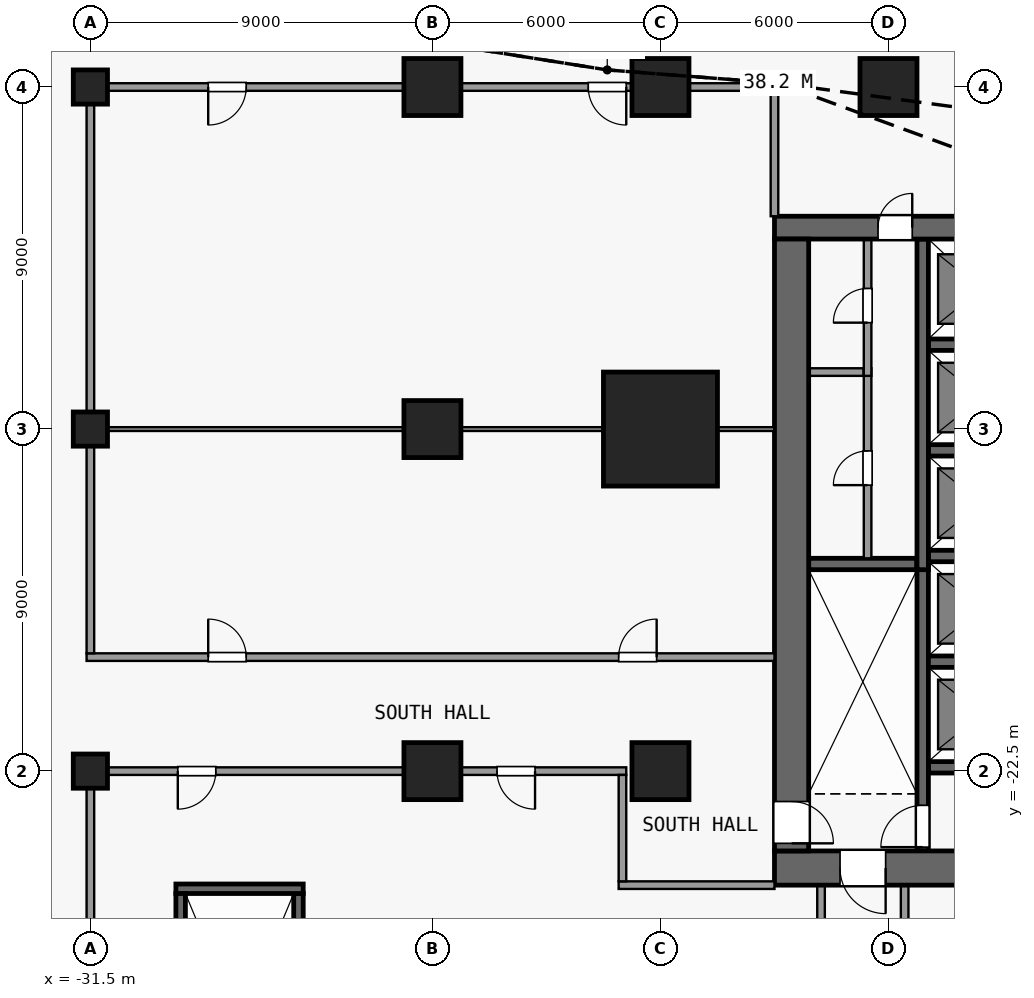
"""IFC4 building model, lengths in metres.
Left out: names, types, materials, properties, quantities, classifications, styles, units other than length and angle.
Written with IfcOpenShell. Run it as: python <this file> out.ifc"""

import sys

from ifc_helpers import new_model, si_unit, direction, frame, frame_2d, origin, origin_2d, place, context, subcontext, project, spatial, rectangle, extrude, element, fill, save


model = new_model("IFC4")
c1 = context("Model", 3, precision=1e-05, world=origin(), true_north=direction((0.0, 1.0)))
c2 = subcontext(c1, "Body", "Model", "MODEL_VIEW")
j1 = project(units=[si_unit("LENGTHUNIT", "METRE"), si_unit("PLANEANGLEUNIT", "RADIAN")], contexts=[c1])
p1 = place(None, origin())
s1 = spatial("IfcSite", under=j1, at=p1, CompositionType="ELEMENT")
p2 = place(p1, origin())
s2 = spatial("IfcBuilding", under=s1, at=p2, CompositionType="ELEMENT")
p3 = place(p2, origin())
s3 = spatial("IfcBuildingStorey", under=s2, at=p3, CompositionType="ELEMENT", Elevation=0.0)
for number, where, z_axis, x_axis in (
    (1, (-31.5, -22.5, 0.0), (0.0, 0.0, 1.0), (1.0, 0.0, 0.0)),
    (2, (-31.5, -13.5, 0.0), (0.0, 0.0, 1.0), (1.0, 0.0, 0.0)),
    (3, (-31.5, -4.5, 0.0), (0.0, 0.0, 1.0), (1.0, 0.0, 0.0)),
):
    element("IfcColumn", number, at=place(p3, frame(where, z_axis=z_axis, x_axis=x_axis)), inside=s3, PredefinedType="COLUMN", context=c2, shape_type="SweptSolid", body=[
        extrude(rectangle(XDim=0.9, YDim=0.9, at=origin_2d()), origin(), (0.0, 0.0, 1.0), 8.0),
    ])
for number, where, z_axis, x_axis in (
    (4, (-22.5, -22.5, 0.0), (0.0, 0.0, 1.0), (1.0, 0.0, 0.0)),
    (5, (-22.5, -13.5, 0.0), (0.0, 0.0, 1.0), (1.0, 0.0, 0.0)),
    (6, (-22.5, -4.5, 0.0), (0.0, 0.0, 1.0), (1.0, 0.0, 0.0)),
    (7, (-16.5, -22.5, 0.0), (0.0, 0.0, 1.0), (1.0, 0.0, 0.0)),
):
    element("IfcColumn", number, at=place(p3, frame(where, z_axis=z_axis, x_axis=x_axis)), inside=s3, PredefinedType="COLUMN", context=c2, shape_type="SweptSolid", body=[
        extrude(rectangle(XDim=1.5, YDim=1.5, at=origin_2d()), origin(), (0.0, 0.0, 1.0), 8.0),
    ])
p4 = place(p3, frame((-16.5, -13.5, 0.0), z_axis=(0.0, 0.0, 1.0), x_axis=(1.0, 0.0, 0.0)))
e8 = element("IfcColumn", 8, at=p4, inside=s3, PredefinedType="COLUMN", context=c2, shape_type="SweptSolid", body=[
    extrude(rectangle(XDim=3.0, YDim=3.0, at=origin_2d()), origin(), (0.0, 0.0, 1.0), 8.0),
])
for number, where, z_axis, x_axis in (
    (9, (-16.5, -4.5, 0.0), (0.0, 0.0, 1.0), (1.0, 0.0, 0.0)),
    (10, (-10.5, -4.5, 0.0), (0.0, 0.0, 1.0), (1.0, 0.0, 0.0)),
):
    element("IfcColumn", number, at=place(p3, frame(where, z_axis=z_axis, x_axis=x_axis)), inside=s3, PredefinedType="COLUMN", context=c2, shape_type="SweptSolid", body=[
        extrude(rectangle(XDim=1.5, YDim=1.5, at=origin_2d()), origin(), (0.0, 0.0, 1.0), 8.0),
    ])
p5 = place(p3, frame((13.5, -25.05, 0.0), z_axis=(0.0, 0.0, 1.0), x_axis=(-1.0, 0.0, 0.0)))
e11 = element("IfcWall", 11, at=p5, inside=s3, PredefinedType="SHEAR", context=c2, shape_type="SweptSolid", body=[
    extrude(rectangle(XDim=27.0, YDim=0.9, at=frame_2d((13.5, 0.0))), origin(), (0.0, 0.0, 1.0), 7.65),
])
p6 = place(p5, frame((24.075, 0.0, 0.0)))
e12 = element("IfcOpeningElement", 12, at=p6, cuts=e11, PredefinedType="OPENING", context=c2, shape_type="SweptSolid", body=[
    extrude(rectangle(XDim=1.2, YDim=2.1, at=frame_2d((0.6, 1.05))), frame((0.0, 0.46, 0.0), z_axis=(0.0, -1.0, 0.0), x_axis=(1.0, 0.0, 0.0)), (0.0, 0.0, 1.0), 0.92),
])
p7 = place(p5, frame((1.725, 0.0, 0.0)))
e13 = element("IfcOpeningElement", 13, at=p7, cuts=e11, PredefinedType="OPENING", context=c2, shape_type="SweptSolid", body=[
    extrude(rectangle(XDim=1.2, YDim=2.1, at=frame_2d((0.6, 1.05))), frame((0.0, 0.46, 0.0), z_axis=(0.0, -1.0, 0.0), x_axis=(1.0, 0.0, 0.0)), (0.0, 0.0, 1.0), 0.92),
])
p8 = place(p3, frame((-13.5, -8.2, 0.0), z_axis=(0.0, 0.0, 1.0), x_axis=(1.0, 0.0, 0.0)))
e14 = element("IfcWall", 14, at=p8, inside=s3, PredefinedType="SHEAR", context=c2, shape_type="SweptSolid", body=[
    extrude(rectangle(XDim=27.0, YDim=0.6, at=frame_2d((13.5, 0.0))), origin(), (0.0, 0.0, 1.0), 7.65),
])
p9 = place(p8, frame((7.8, 0.0, 0.0)))
e15 = element("IfcOpeningElement", 15, at=p9, cuts=e14, PredefinedType="OPENING", context=c2, shape_type="SweptSolid", body=[
    extrude(rectangle(XDim=1.8, YDim=2.1, at=frame_2d((0.9, 1.05))), frame((0.0, 0.31, 0.0), z_axis=(0.0, -1.0, 0.0), x_axis=(1.0, 0.0, 0.0)), (0.0, 0.0, 1.0), 0.62),
])
p10 = place(p8, frame((17.4, 0.0, 0.0)))
e16 = element("IfcOpeningElement", 16, at=p10, cuts=e14, PredefinedType="OPENING", context=c2, shape_type="SweptSolid", body=[
    extrude(rectangle(XDim=1.8, YDim=2.1, at=frame_2d((0.9, 1.05))), frame((0.0, 0.31, 0.0), z_axis=(0.0, -1.0, 0.0), x_axis=(1.0, 0.0, 0.0)), (0.0, 0.0, 1.0), 0.62),
])
p11 = place(p8, frame((2.725, 0.0, 0.0)))
e17 = element("IfcOpeningElement", 17, at=p11, cuts=e14, PredefinedType="OPENING", context=c2, shape_type="SweptSolid", body=[
    extrude(rectangle(XDim=0.9, YDim=2.1, at=frame_2d((0.45, 1.05))), frame((0.0, 0.31, 0.0), z_axis=(0.0, -1.0, 0.0), x_axis=(1.0, 0.0, 0.0)), (0.0, 0.0, 1.0), 0.62),
])
p12 = place(p8, frame((24.075, 0.0, 0.0)))
e18 = element("IfcOpeningElement", 18, at=p12, cuts=e14, PredefinedType="OPENING", context=c2, shape_type="SweptSolid", body=[
    extrude(rectangle(XDim=1.2, YDim=2.1, at=frame_2d((0.6, 1.05))), frame((0.0, 0.31, 0.0), z_axis=(0.0, -1.0, 0.0), x_axis=(1.0, 0.0, 0.0)), (0.0, 0.0, 1.0), 0.62),
])
p13 = place(p3, frame((-13.05, -8.5, 0.0), z_axis=(0.0, 0.0, 1.0), x_axis=(0.0, -1.0, 0.0)))
e19 = element("IfcWall", 19, at=p13, inside=s3, PredefinedType="SHEAR", context=c2, shape_type="SweptSolid", body=[
    extrude(rectangle(XDim=16.1, YDim=0.9, at=frame_2d((8.05, 0.0))), origin(), (0.0, 0.0, 1.0), 7.65),
])
p14 = place(p13, frame((14.8, 0.0, 0.0)))
e20 = element("IfcOpeningElement", 20, at=p14, cuts=e19, PredefinedType="OPENING", context=c2, shape_type="SweptSolid", body=[
    extrude(rectangle(XDim=1.1, YDim=2.1, at=frame_2d((0.55, 1.05))), frame((0.0, 0.46, 0.0), z_axis=(0.0, -1.0, 0.0), x_axis=(1.0, 0.0, 0.0)), (0.0, 0.0, 1.0), 0.92),
])
for number, where, z_axis, x_axis in (
    (21, (-9.45, -22.4, 0.0), (0.0, 0.0, 1.0), (1.0, 0.0, 0.0)),
    (22, (-9.45, -19.62, 0.0), (0.0, 0.0, 1.0), (1.0, 0.0, 0.0)),
):
    element("IfcWall", number, at=place(p3, frame(where, z_axis=z_axis, x_axis=x_axis)), inside=s3, PredefinedType="SHEAR", context=c2, shape_type="SweptSolid", body=[
        extrude(rectangle(XDim=2.8, YDim=0.3, at=frame_2d((1.4, 0.0))), origin(), (0.0, 0.0, 1.0), 7.65),
    ])
p15 = place(p3, frame((-12.6, -17.05, 0.0), z_axis=(0.0, 0.0, 1.0), x_axis=(1.0, 0.0, 0.0)))
e23 = element("IfcWall", 23, at=p15, inside=s3, PredefinedType="SHEAR", context=c2, shape_type="SweptSolid", body=[
    extrude(rectangle(XDim=2.85, YDim=0.3, at=frame_2d((1.425, 0.0))), origin(), (0.0, 0.0, 1.0), 7.65),
])
for number, where, z_axis, x_axis in (
    (24, (-9.45, -16.84, 0.0), (0.0, 0.0, 1.0), (1.0, 0.0, 0.0)),
    (25, (-9.45, -14.06, 0.0), (0.0, 0.0, 1.0), (1.0, 0.0, 0.0)),
):
    element("IfcWall", number, at=place(p3, frame(where, z_axis=z_axis, x_axis=x_axis)), inside=s3, PredefinedType="SHEAR", context=c2, shape_type="SweptSolid", body=[
        extrude(rectangle(XDim=2.8, YDim=0.3, at=frame_2d((1.4, 0.0))), origin(), (0.0, 0.0, 1.0), 7.65),
    ])
p16 = place(p3, frame((-12.6, -12.0, 0.0), z_axis=(0.0, 0.0, 1.0), x_axis=(1.0, 0.0, 0.0)))
e26 = element("IfcWall", 26, at=p16, inside=s3, PredefinedType="PARTITIONING", context=c2, shape_type="SweptSolid", body=[
    extrude(rectangle(XDim=1.45, YDim=0.2, at=frame_2d((0.725, 0.0))), origin(), (0.0, 0.0, 1.0), 7.65),
])
p17 = place(p3, frame((-9.45, -11.28, 0.0), z_axis=(0.0, 0.0, 1.0), x_axis=(1.0, 0.0, 0.0)))
e27 = element("IfcWall", 27, at=p17, inside=s3, PredefinedType="SHEAR", context=c2, shape_type="SweptSolid", body=[
    extrude(rectangle(XDim=2.8, YDim=0.3, at=frame_2d((1.4, 0.0))), origin(), (0.0, 0.0, 1.0), 7.65),
])
p18 = place(p3, frame((-11.05, -16.9, 0.0), z_axis=(0.0, 0.0, 1.0), x_axis=(0.0, 1.0, 0.0)))
e28 = element("IfcWall", 28, at=p18, inside=s3, PredefinedType="PARTITIONING", context=c2, shape_type="SweptSolid", body=[
    extrude(rectangle(XDim=5.0, YDim=0.2, at=frame_2d((2.5, 0.0))), origin(), (0.0, 0.0, 1.0), 7.65),
])
p19 = place(p18, frame((1.925, 0.0, 0.0)))
e29 = element("IfcOpeningElement", 29, at=p19, cuts=e28, PredefinedType="OPENING", context=c2, shape_type="SweptSolid", body=[
    extrude(rectangle(XDim=0.9, YDim=2.1, at=frame_2d((0.45, 1.05))), frame((0.0, 0.11, 0.0), z_axis=(0.0, -1.0, 0.0), x_axis=(1.0, 0.0, 0.0)), (0.0, 0.0, 1.0), 0.22),
])
p20 = place(p3, frame((-11.05, -12.1, 0.0), z_axis=(0.0, 0.0, 1.0), x_axis=(0.0, 1.0, 0.0)))
e30 = element("IfcWall", 30, at=p20, inside=s3, PredefinedType="PARTITIONING", context=c2, shape_type="SweptSolid", body=[
    extrude(rectangle(XDim=3.6, YDim=0.2, at=frame_2d((1.8, 0.0))), origin(), (0.0, 0.0, 1.0), 7.65),
])
p21 = place(p20, frame((1.4, 0.0, 0.0)))
e31 = element("IfcOpeningElement", 31, at=p21, cuts=e30, PredefinedType="OPENING", context=c2, shape_type="SweptSolid", body=[
    extrude(rectangle(XDim=0.9, YDim=2.1, at=frame_2d((0.45, 1.05))), frame((0.0, 0.11, 0.0), z_axis=(0.0, -1.0, 0.0), x_axis=(1.0, 0.0, 0.0)), (0.0, 0.0, 1.0), 0.22),
])
p22 = place(p3, frame((-9.6, -24.6, 0.0), z_axis=(0.0, 0.0, 1.0), x_axis=(0.0, 1.0, 0.0)))
e32 = element("IfcWall", 32, at=p22, inside=s3, PredefinedType="SHEAR", context=c2, shape_type="SweptSolid", body=[
    extrude(rectangle(XDim=7.7, YDim=0.3, at=frame_2d((3.85, 0.0))), origin(), (0.0, 0.0, 1.0), 7.65),
])
p23 = place(p22, frame((0.1, 0.0, 0.0)))
e33 = element("IfcOpeningElement", 33, at=p23, cuts=e32, PredefinedType="OPENING", context=c2, shape_type="SweptSolid", body=[
    extrude(rectangle(XDim=1.1, YDim=2.1, at=frame_2d((0.55, 1.05))), frame((0.0, 0.16, 0.0), z_axis=(0.0, -1.0, 0.0), x_axis=(1.0, 0.0, 0.0)), (0.0, 0.0, 1.0), 0.32),
])
p24 = place(p3, frame((-9.6, -17.2, 0.0), z_axis=(0.0, 0.0, 1.0), x_axis=(0.0, 1.0, 0.0)))
e34 = element("IfcWall", 34, at=p24, inside=s3, PredefinedType="SHEAR", context=c2, shape_type="SweptSolid", body=[
    extrude(rectangle(XDim=8.7, YDim=0.3, at=frame_2d((4.35, 0.0))), origin(), (0.0, 0.0, 1.0), 7.65),
])
p25 = place(p3, frame((-12.275, -25.5, 0.0), z_axis=(0.0, 0.0, 1.0), x_axis=(0.0, -1.0, 0.0)))
e35 = element("IfcWall", 35, at=p25, inside=s3, PredefinedType="PARTITIONING", context=c2, shape_type="SweptSolid", body=[
    extrude(rectangle(XDim=8.85, YDim=0.2, at=frame_2d((4.425, 0.0))), origin(), (0.0, 0.0, 1.0), 7.65),
])
p26 = place(p3, frame((-10.075, -34.35, 0.0), z_axis=(0.0, 0.0, 1.0), x_axis=(0.0, 1.0, 0.0)))
e36 = element("IfcWall", 36, at=p26, inside=s3, PredefinedType="PARTITIONING", context=c2, shape_type="SweptSolid", body=[
    extrude(rectangle(XDim=8.85, YDim=0.2, at=frame_2d((4.425, 0.0))), origin(), (0.0, 0.0, 1.0), 7.65),
])
p27 = place(p26, frame((0.85, 0.0, 0.0)))
e37 = element("IfcOpeningElement", 37, at=p27, cuts=e36, PredefinedType="OPENING", context=c2, shape_type="SweptSolid", body=[
    extrude(rectangle(XDim=1.0, YDim=2.1, at=frame_2d((0.5, 1.05))), frame((0.0, 0.11, 0.0), z_axis=(0.0, -1.0, 0.0), x_axis=(1.0, 0.0, 0.0)), (0.0, 0.0, 1.0), 0.22),
])
for number, where, z_axis, x_axis in (
    (38, (-29.125, -27.07, 0.0), (0.0, 0.0, 1.0), (0.0, 1.0, 0.0)),
    (39, (-26.025, -27.07, 0.0), (0.0, 0.0, 1.0), (0.0, 1.0, 0.0)),
):
    element("IfcWall", number, at=place(p3, frame(where, z_axis=z_axis, x_axis=x_axis)), inside=s3, PredefinedType="SHEAR", context=c2, shape_type="SweptSolid", body=[
        extrude(rectangle(XDim=1.35, YDim=0.25, at=frame_2d((0.675, 0.0))), origin(), (0.0, 0.0, 1.0), 7.65),
    ])
p28 = place(p3, frame((-29.25, -25.595, 0.0), z_axis=(0.0, 0.0, 1.0), x_axis=(1.0, 0.0, 0.0)))
e40 = element("IfcWall", 40, at=p28, inside=s3, PredefinedType="SHEAR", context=c2, shape_type="SweptSolid", body=[
    extrude(rectangle(XDim=3.35, YDim=0.25, at=frame_2d((1.675, 0.0))), origin(), (0.0, 0.0, 1.0), 7.65),
])
p29 = place(p3, frame((-17.6, -25.5, 0.0), z_axis=(0.0, 0.0, 1.0), x_axis=(1.0, 0.0, 0.0)))
e41 = element("IfcWall", 41, at=p29, inside=s3, PredefinedType="PARTITIONING", context=c2, shape_type="SweptSolid", body=[
    extrude(rectangle(XDim=4.1, YDim=0.2, at=frame_2d((2.05, 0.0))), origin(), (0.0, 0.0, 1.0), 7.65),
])
p30 = place(p3, frame((-31.6, -22.5, 0.0), z_axis=(0.0, 0.0, 1.0), x_axis=(1.0, 0.0, 0.0)))
e42 = element("IfcWall", 42, at=p30, inside=s3, PredefinedType="PARTITIONING", context=c2, shape_type="SweptSolid", body=[
    extrude(rectangle(XDim=14.2, YDim=0.2, at=frame_2d((7.1, 0.0))), origin(), (0.0, 0.0, 1.0), 7.65),
])
p31 = place(p30, frame((2.4, 0.0, 0.0)))
e43 = element("IfcOpeningElement", 43, at=p31, cuts=e42, PredefinedType="OPENING", context=c2, shape_type="SweptSolid", body=[
    extrude(rectangle(XDim=1.0, YDim=2.1, at=frame_2d((0.5, 1.05))), frame((0.0, 0.11, 0.0), z_axis=(0.0, -1.0, 0.0), x_axis=(1.0, 0.0, 0.0)), (0.0, 0.0, 1.0), 0.22),
])
p32 = place(p30, frame((10.8, 0.0, 0.0)))
e44 = element("IfcOpeningElement", 44, at=p32, cuts=e42, PredefinedType="OPENING", context=c2, shape_type="SweptSolid", body=[
    extrude(rectangle(XDim=1.0, YDim=2.1, at=frame_2d((0.5, 1.05))), frame((0.0, 0.11, 0.0), z_axis=(0.0, -1.0, 0.0), x_axis=(1.0, 0.0, 0.0)), (0.0, 0.0, 1.0), 0.22),
])
p33 = place(p3, frame((-31.6, -19.5, 0.0), z_axis=(0.0, 0.0, 1.0), x_axis=(1.0, 0.0, 0.0)))
e45 = element("IfcWall", 45, at=p33, inside=s3, PredefinedType="PARTITIONING", context=c2, shape_type="SweptSolid", body=[
    extrude(rectangle(XDim=18.1, YDim=0.2, at=frame_2d((9.05, 0.0))), origin(), (0.0, 0.0, 1.0), 7.65),
])
p34 = place(p33, frame((3.2, 0.0, 0.0)))
e46 = element("IfcOpeningElement", 46, at=p34, cuts=e45, PredefinedType="OPENING", context=c2, shape_type="SweptSolid", body=[
    extrude(rectangle(XDim=1.0, YDim=2.1, at=frame_2d((0.5, 1.05))), frame((0.0, 0.11, 0.0), z_axis=(0.0, -1.0, 0.0), x_axis=(1.0, 0.0, 0.0)), (0.0, 0.0, 1.0), 0.22),
])
p35 = place(p33, frame((14.0, 0.0, 0.0)))
e47 = element("IfcOpeningElement", 47, at=p35, cuts=e45, PredefinedType="OPENING", context=c2, shape_type="SweptSolid", body=[
    extrude(rectangle(XDim=1.0, YDim=2.1, at=frame_2d((0.5, 1.05))), frame((0.0, 0.11, 0.0), z_axis=(0.0, -1.0, 0.0), x_axis=(1.0, 0.0, 0.0)), (0.0, 0.0, 1.0), 0.22),
])
p36 = place(p3, frame((-31.4, -13.5, 0.0), z_axis=(0.0, 0.0, 1.0), x_axis=(1.0, 0.0, 0.0)))
e48 = element("IfcWall", 48, at=p36, inside=s3, PredefinedType="PARTITIONING", context=c2, shape_type="SweptSolid", body=[
    extrude(rectangle(XDim=17.9, YDim=0.1, at=frame_2d((8.95, 0.0))), origin(), (0.0, 0.0, 1.0), 7.65),
])
p37 = place(p3, frame((-31.6, -4.5, 0.0), z_axis=(0.0, 0.0, 1.0), x_axis=(1.0, 0.0, 0.0)))
e49 = element("IfcWall", 49, at=p37, inside=s3, PredefinedType="PARTITIONING", context=c2, shape_type="SweptSolid", body=[
    extrude(rectangle(XDim=18.2, YDim=0.2, at=frame_2d((9.1, 0.0))), origin(), (0.0, 0.0, 1.0), 7.65),
])
p38 = place(p37, frame((3.2, 0.0, 0.0)))
e50 = element("IfcOpeningElement", 50, at=p38, cuts=e49, PredefinedType="OPENING", context=c2, shape_type="SweptSolid", body=[
    extrude(rectangle(XDim=1.0, YDim=2.1, at=frame_2d((0.5, 1.05))), frame((0.0, 0.11, 0.0), z_axis=(0.0, -1.0, 0.0), x_axis=(1.0, 0.0, 0.0)), (0.0, 0.0, 1.0), 0.22),
])
p39 = place(p37, frame((13.2, 0.0, 0.0)))
e51 = element("IfcOpeningElement", 51, at=p39, cuts=e49, PredefinedType="OPENING", context=c2, shape_type="SweptSolid", body=[
    extrude(rectangle(XDim=1.0, YDim=2.1, at=frame_2d((0.5, 1.05))), frame((0.0, 0.11, 0.0), z_axis=(0.0, -1.0, 0.0), x_axis=(1.0, 0.0, 0.0)), (0.0, 0.0, 1.0), 0.22),
])
p40 = place(p3, frame((-31.5, -31.4, 0.0), z_axis=(0.0, 0.0, 1.0), x_axis=(0.0, 1.0, 0.0)))
e52 = element("IfcWall", 52, at=p40, inside=s3, PredefinedType="PARTITIONING", context=c2, shape_type="SweptSolid", body=[
    extrude(rectangle(XDim=8.8, YDim=0.2, at=frame_2d((4.4, 0.0))), origin(), (0.0, 0.0, 1.0), 7.65),
])
p41 = place(p3, frame((-31.5, -19.4, 0.0), z_axis=(0.0, 0.0, 1.0), x_axis=(0.0, 1.0, 0.0)))
e53 = element("IfcWall", 53, at=p41, inside=s3, PredefinedType="PARTITIONING", context=c2, shape_type="SweptSolid", body=[
    extrude(rectangle(XDim=14.8, YDim=0.2, at=frame_2d((7.4, 0.0))), origin(), (0.0, 0.0, 1.0), 7.65),
])
p42 = place(p3, frame((-17.5, -25.4, 0.0), z_axis=(0.0, 0.0, 1.0), x_axis=(0.0, 1.0, 0.0)))
e54 = element("IfcWall", 54, at=p42, inside=s3, PredefinedType="PARTITIONING", context=c2, shape_type="SweptSolid", body=[
    extrude(rectangle(XDim=2.8, YDim=0.2, at=frame_2d((1.4, 0.0))), origin(), (0.0, 0.0, 1.0), 7.65),
])
p43 = place(p3, frame((-13.5, -7.9, 0.0), z_axis=(0.0, 0.0, 1.0), x_axis=(0.0, 1.0, 0.0)))
e55 = element("IfcWall", 55, at=p43, inside=s3, PredefinedType="PARTITIONING", context=c2, shape_type="SweptSolid", body=[
    extrude(rectangle(XDim=3.3, YDim=0.2, at=frame_2d((1.65, 0.0))), origin(), (0.0, 0.0, 1.0), 7.65),
])
p44 = place(p6, origin())
e56 = element("IfcDoor", 56, at=p44, inside=s3, OperationType="SINGLE_SWING_LEFT", PredefinedType="DOOR", context=c2, shape_type="SweptSolid", body=[
    extrude(rectangle(XDim=1.2, YDim=2.1, at=frame_2d((0.6, 1.05))), frame((0.0, 0.025, 0.0), z_axis=(0.0, -1.0, 0.0), x_axis=(1.0, 0.0, 0.0)), (0.0, 0.0, 1.0), 0.05),
])
fill(e12, e56)
p45 = place(p21, origin())
e57 = element("IfcDoor", 57, at=p45, inside=s3, OperationType="SINGLE_SWING_LEFT", PredefinedType="DOOR", context=c2, shape_type="SweptSolid", body=[
    extrude(rectangle(XDim=0.9, YDim=2.1, at=frame_2d((0.45, 1.05))), frame((0.0, 0.025, 0.0), z_axis=(0.0, -1.0, 0.0), x_axis=(1.0, 0.0, 0.0)), (0.0, 0.0, 1.0), 0.05),
])
fill(e31, e57)
p46 = place(p11, origin())
e58 = element("IfcDoor", 58, at=p46, inside=s3, OperationType="SINGLE_SWING_RIGHT", PredefinedType="DOOR", context=c2, shape_type="SweptSolid", body=[
    extrude(rectangle(XDim=0.9, YDim=2.1, at=frame_2d((0.45, 1.05))), frame((0.0, 0.025, 0.0), z_axis=(0.0, -1.0, 0.0), x_axis=(1.0, 0.0, 0.0)), (0.0, 0.0, 1.0), 0.05),
])
fill(e17, e58)
p47 = place(p19, origin())
e59 = element("IfcDoor", 59, at=p47, inside=s3, OperationType="SINGLE_SWING_LEFT", PredefinedType="DOOR", context=c2, shape_type="SweptSolid", body=[
    extrude(rectangle(XDim=0.9, YDim=2.1, at=frame_2d((0.45, 1.05))), frame((0.0, 0.025, 0.0), z_axis=(0.0, -1.0, 0.0), x_axis=(1.0, 0.0, 0.0)), (0.0, 0.0, 1.0), 0.05),
])
fill(e29, e59)
p48 = place(p23, origin())
e60 = element("IfcDoor", 60, at=p48, inside=s3, OperationType="SINGLE_SWING_LEFT", PredefinedType="DOOR", context=c2, shape_type="SweptSolid", body=[
    extrude(rectangle(XDim=1.1, YDim=2.1, at=frame_2d((0.55, 1.05))), frame((0.0, 0.025, 0.0), z_axis=(0.0, -1.0, 0.0), x_axis=(1.0, 0.0, 0.0)), (0.0, 0.0, 1.0), 0.05),
])
fill(e33, e60)
p49 = place(p14, origin())
e61 = element("IfcDoor", 61, at=p49, inside=s3, OperationType="SINGLE_SWING_RIGHT", PredefinedType="DOOR", context=c2, shape_type="SweptSolid", body=[
    extrude(rectangle(XDim=1.1, YDim=2.1, at=frame_2d((0.55, 1.05))), frame((0.0, 0.025, 0.0), z_axis=(0.0, -1.0, 0.0), x_axis=(1.0, 0.0, 0.0)), (0.0, 0.0, 1.0), 0.05),
])
fill(e20, e61)
p50 = place(p31, origin())
e62 = element("IfcDoor", 62, at=p50, inside=s3, OperationType="SINGLE_SWING_LEFT", PredefinedType="DOOR", context=c2, shape_type="SweptSolid", body=[
    extrude(rectangle(XDim=1.0, YDim=2.1, at=frame_2d((0.5, 1.05))), frame((0.0, 0.025, 0.0), z_axis=(0.0, -1.0, 0.0), x_axis=(1.0, 0.0, 0.0)), (0.0, 0.0, 1.0), 0.05),
])
fill(e43, e62)
p51 = place(p32, origin())
e63 = element("IfcDoor", 63, at=p51, inside=s3, OperationType="SINGLE_SWING_RIGHT", PredefinedType="DOOR", context=c2, shape_type="SweptSolid", body=[
    extrude(rectangle(XDim=1.0, YDim=2.1, at=frame_2d((0.5, 1.05))), frame((0.0, 0.025, 0.0), z_axis=(0.0, -1.0, 0.0), x_axis=(1.0, 0.0, 0.0)), (0.0, 0.0, 1.0), 0.05),
])
fill(e44, e63)
p52 = place(p34, origin())
e64 = element("IfcDoor", 64, at=p52, inside=s3, OperationType="SINGLE_SWING_RIGHT", PredefinedType="DOOR", context=c2, shape_type="SweptSolid", body=[
    extrude(rectangle(XDim=1.0, YDim=2.1, at=frame_2d((0.5, 1.05))), frame((0.0, 0.025, 0.0), z_axis=(0.0, -1.0, 0.0), x_axis=(1.0, 0.0, 0.0)), (0.0, 0.0, 1.0), 0.05),
])
fill(e46, e64)
p53 = place(p35, origin())
e65 = element("IfcDoor", 65, at=p53, inside=s3, OperationType="SINGLE_SWING_LEFT", PredefinedType="DOOR", context=c2, shape_type="SweptSolid", body=[
    extrude(rectangle(XDim=1.0, YDim=2.1, at=frame_2d((0.5, 1.05))), frame((0.0, 0.025, 0.0), z_axis=(0.0, -1.0, 0.0), x_axis=(1.0, 0.0, 0.0)), (0.0, 0.0, 1.0), 0.05),
])
fill(e47, e65)
p54 = place(p38, origin())
e66 = element("IfcDoor", 66, at=p54, inside=s3, OperationType="SINGLE_SWING_LEFT", PredefinedType="DOOR", context=c2, shape_type="SweptSolid", body=[
    extrude(rectangle(XDim=1.0, YDim=2.1, at=frame_2d((0.5, 1.05))), frame((0.0, 0.025, 0.0), z_axis=(0.0, -1.0, 0.0), x_axis=(1.0, 0.0, 0.0)), (0.0, 0.0, 1.0), 0.05),
])
fill(e50, e66)
p55 = place(p39, origin())
e67 = element("IfcDoor", 67, at=p55, inside=s3, OperationType="SINGLE_SWING_RIGHT", PredefinedType="DOOR", context=c2, shape_type="SweptSolid", body=[
    extrude(rectangle(XDim=1.0, YDim=2.1, at=frame_2d((0.5, 1.05))), frame((0.0, 0.025, 0.0), z_axis=(0.0, -1.0, 0.0), x_axis=(1.0, 0.0, 0.0)), (0.0, 0.0, 1.0), 0.05),
])
fill(e51, e67)
save(model, sys.argv[1])
